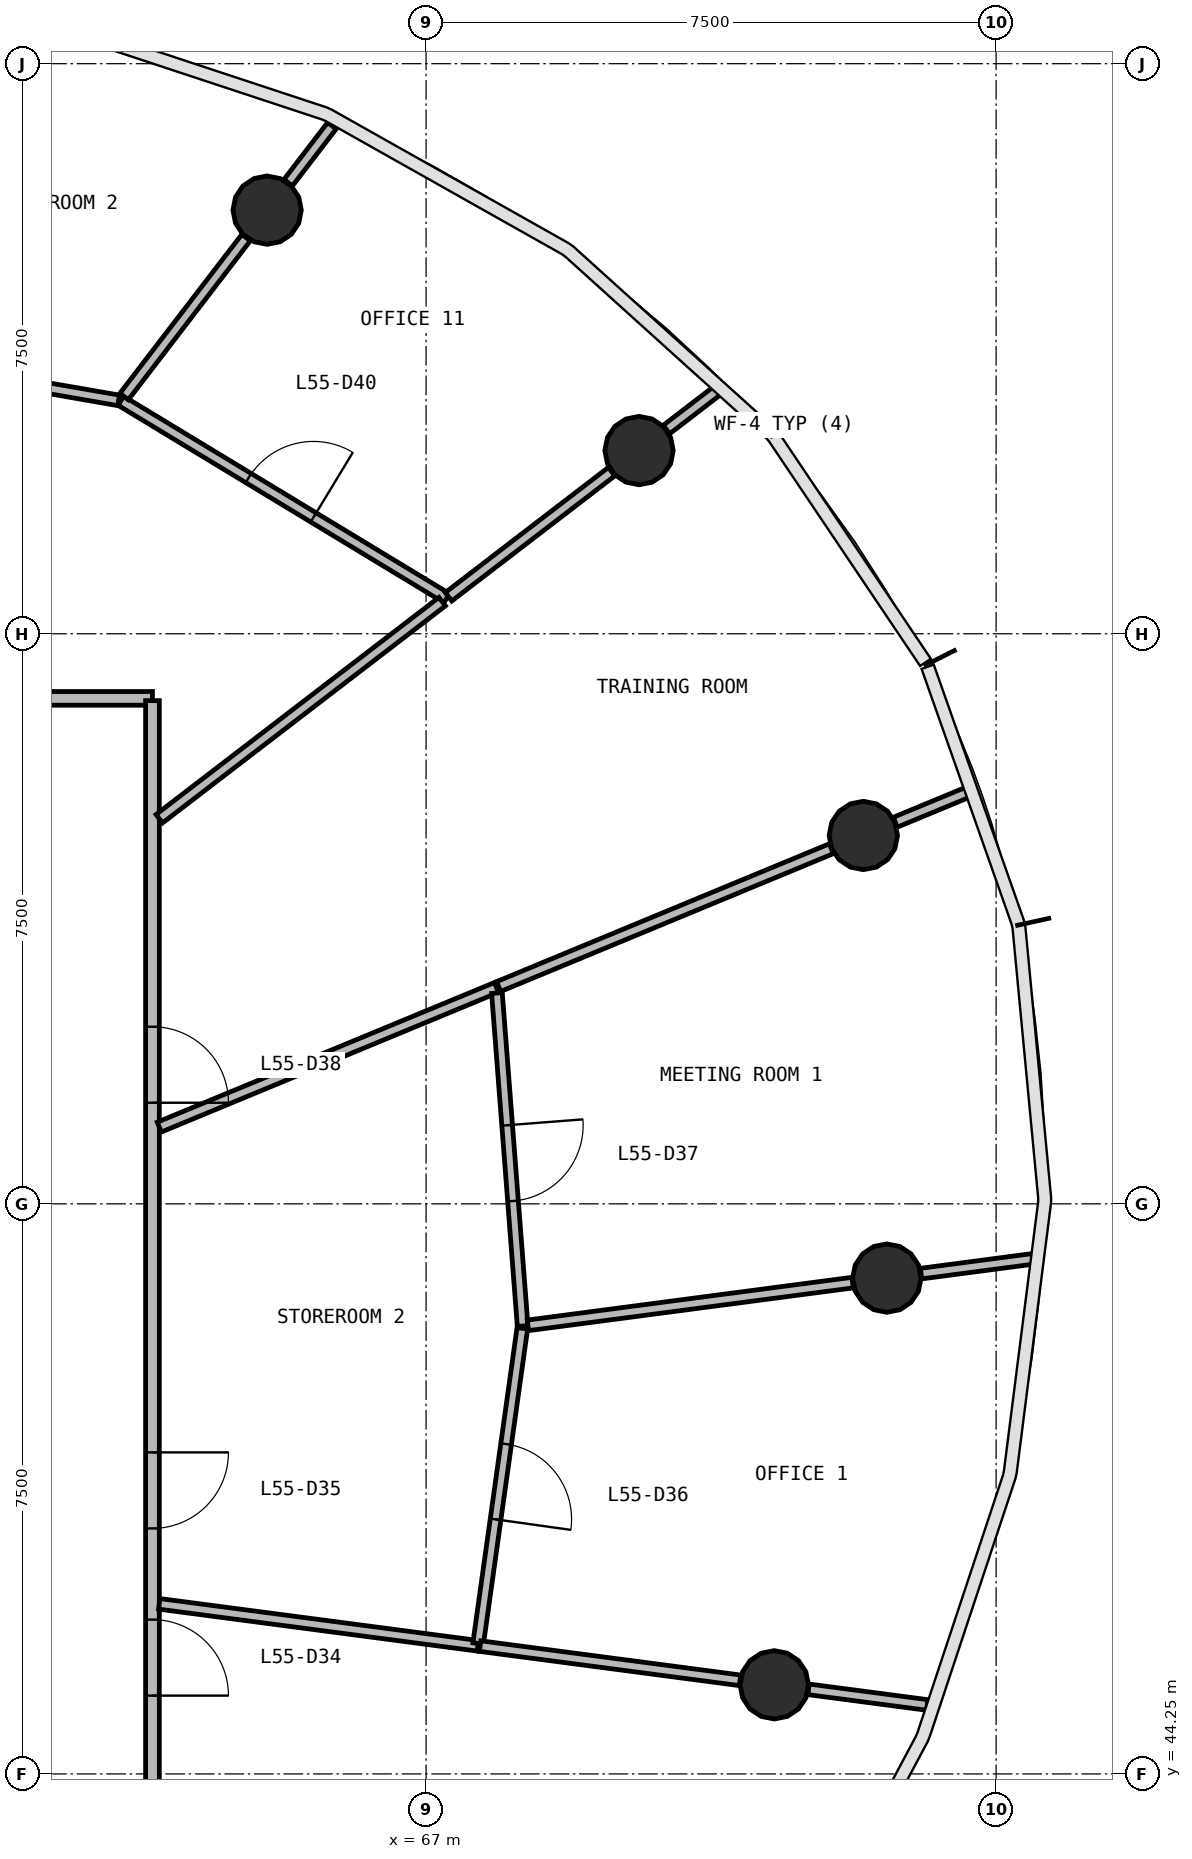
"""IFC4 building model, lengths in metres.
Left out: names, types, materials, properties, quantities, classifications, styles, units other than length and angle.
Written with IfcOpenShell. Run it as: python <this file> out.ifc"""

import sys

from ifc_helpers import new_model, si_unit, direction, frame, frame_2d, origin, origin_2d, place, context, subcontext, project, spatial, rectangle, circle, extrude, source, transform, mapped, element, fill, save


model = new_model("IFC4")
c1 = context("Model", 3, precision=1e-05, world=origin(), true_north=direction((0.0, 1.0)))
c2 = subcontext(c1, "Body", "Model", "MODEL_VIEW")
j1 = project(units=[si_unit("LENGTHUNIT", "METRE"), si_unit("PLANEANGLEUNIT", "RADIAN")], contexts=[c1])
p1 = place(None, origin())
s1 = spatial("IfcSite", under=j1, at=p1, CompositionType="ELEMENT")
p2 = place(p1, origin())
s2 = spatial("IfcBuilding", under=s1, at=p2, CompositionType="ELEMENT")
p3 = place(p2, frame((0.0, 0.0, 226.7)))
s3 = spatial("IfcBuildingStorey", under=s2, at=p3, CompositionType="ELEMENT", Elevation=226.7)
m1 = source(origin(), c2, "Body", "SweptSolid", [
    extrude(circle(Radius=0.45, at=origin_2d()), origin(), (0.0, 0.0, 1.0), 3.9),
])
for number, where, z_axis, x_axis in (
    (1, (73.062, 50.773, 0.0), (0.0, 0.0, 1.0), (1.0, 0.0, 0.0)),
    (2, (72.753, 56.596, 0.0), (0.0, 0.0, 1.0), (1.0, 0.0, 0.0)),
    (3, (69.802, 61.66, 0.0), (0.0, 0.0, 1.0), (1.0, 0.0, 0.0)),
    (4, (64.909, 64.823, 0.0), (0.0, 0.0, 1.0), (1.0, 0.0, 0.0)),
    (5, (71.581, 45.422, 0.0), (0.0, 0.0, 1.0), (1.0, 0.0, 0.0)),
):
    element("IfcColumn", number, at=place(p3, frame(where, z_axis=z_axis, x_axis=x_axis)), inside=s3, PredefinedType="COLUMN", context=c2, shape_type="MappedRepresentation", body=[
        mapped(m1, transform((0.0, 0.0, 0.0), scale=1.0)),
    ])
p4 = place(p3, frame((40.6, 58.4, 0.0), z_axis=(0.0, 0.0, 1.0), x_axis=(1.0, 0.0, 0.0)))
e6 = element("IfcWall", 6, at=p4, inside=s3, PredefinedType="PARTITIONING", context=c2, shape_type="SweptSolid", body=[
    extrude(rectangle(XDim=22.8, YDim=0.18, at=frame_2d((11.4, 0.0))), origin(), (0.0, 0.0, 1.0), 2.7),
])
p5 = place(p4, frame((2.05, 0.0, 0.0)))
e7 = element("IfcOpeningElement", 7, at=p5, cuts=e6, PredefinedType="OPENING", context=c2, shape_type="SweptSolid", body=[
    extrude(rectangle(XDim=0.9, YDim=2.1, at=frame_2d((0.45, 1.05))), frame((0.0, 0.1, 0.0), z_axis=(0.0, -1.0, 0.0), x_axis=(1.0, 0.0, 0.0)), (0.0, 0.0, 1.0), 0.2),
])
p6 = place(p4, frame((12.95, 0.0, 0.0)))
e8 = element("IfcOpeningElement", 8, at=p6, cuts=e6, PredefinedType="OPENING", context=c2, shape_type="SweptSolid", body=[
    extrude(rectangle(XDim=1.0, YDim=2.1, at=frame_2d((0.5, 1.05))), frame((0.0, 0.1, 0.0), z_axis=(0.0, -1.0, 0.0), x_axis=(1.0, 0.0, 0.0)), (0.0, 0.0, 1.0), 0.2),
])
p7 = place(p4, frame((10.95, 0.0, 0.0)))
e9 = element("IfcOpeningElement", 9, at=p7, cuts=e6, PredefinedType="OPENING", context=c2, shape_type="SweptSolid", body=[
    extrude(rectangle(XDim=1.0, YDim=2.1, at=frame_2d((0.5, 1.05))), frame((0.0, 0.1, 0.0), z_axis=(0.0, -1.0, 0.0), x_axis=(1.0, 0.0, 0.0)), (0.0, 0.0, 1.0), 0.2),
])
p8 = place(p3, frame((63.4, 58.37, 0.0), z_axis=(0.0, 0.0, 1.0), x_axis=(0.0, -1.0, 0.0)))
e10 = element("IfcWall", 10, at=p8, inside=s3, PredefinedType="PARTITIONING", context=c2, shape_type="SweptSolid", body=[
    extrude(rectangle(XDim=20.74, YDim=0.18, at=frame_2d((10.37, 0.0))), origin(), (0.0, 0.0, 1.0), 2.7),
])
p9 = place(p8, frame((12.09, 0.0, 0.0)))
e11 = element("IfcOpeningElement", 11, at=p9, cuts=e10, PredefinedType="OPENING", context=c2, shape_type="SweptSolid", body=[
    extrude(rectangle(XDim=1.0, YDim=2.1, at=frame_2d((0.5, 1.05))), frame((0.0, 0.1, 0.0), z_axis=(0.0, -1.0, 0.0), x_axis=(1.0, 0.0, 0.0)), (0.0, 0.0, 1.0), 0.2),
])
p10 = place(p8, frame((9.89, 0.0, 0.0)))
e12 = element("IfcOpeningElement", 12, at=p10, cuts=e10, PredefinedType="OPENING", context=c2, shape_type="SweptSolid", body=[
    extrude(rectangle(XDim=1.0, YDim=2.1, at=frame_2d((0.5, 1.05))), frame((0.0, 0.1, 0.0), z_axis=(0.0, -1.0, 0.0), x_axis=(1.0, 0.0, 0.0)), (0.0, 0.0, 1.0), 0.2),
])
p11 = place(p8, frame((4.29, 0.0, 0.0)))
e13 = element("IfcOpeningElement", 13, at=p11, cuts=e10, PredefinedType="OPENING", context=c2, shape_type="SweptSolid", body=[
    extrude(rectangle(XDim=1.0, YDim=2.1, at=frame_2d((0.5, 1.05))), frame((0.0, 0.1, 0.0), z_axis=(0.0, -1.0, 0.0), x_axis=(1.0, 0.0, 0.0)), (0.0, 0.0, 1.0), 0.2),
])
p12 = place(p3, frame((62.985, 62.315, 0.0), z_axis=(0.0, 0.0, 1.0), x_axis=(0.855336503229, -0.518072838744, 0.0)))
e14 = element("IfcWall", 14, at=p12, inside=s3, PredefinedType="PARTITIONING", context=c2, shape_type="SweptSolid", body=[
    extrude(rectangle(XDim=5.012, YDim=0.14, at=frame_2d((2.506, 0.0))), origin(), (0.0, 0.0, 1.0), 2.7),
])
p13 = place(p12, frame((1.962, 0.0, 0.0)))
e15 = element("IfcOpeningElement", 15, at=p13, cuts=e14, PredefinedType="OPENING", context=c2, shape_type="SweptSolid", body=[
    extrude(rectangle(XDim=1.0, YDim=2.1, at=frame_2d((0.5, 1.05))), frame((0.0, 0.08, 0.0), z_axis=(0.0, -1.0, 0.0), x_axis=(1.0, 0.0, 0.0)), (0.0, 0.0, 1.0), 0.16),
])
p14 = place(p3, frame((63.49, 52.759, 0.0), z_axis=(0.0, 0.0, 1.0), x_axis=(0.923870600529, 0.382704995366, 0.0)))
e16 = element("IfcWall", 16, at=p14, inside=s3, PredefinedType="PARTITIONING", context=c2, shape_type="SweptSolid", body=[
    extrude(rectangle(XDim=4.802, YDim=0.14, at=frame_2d((2.401, 0.0))), origin(), (0.0, 0.0, 1.0), 2.7),
])
p15 = place(p3, frame((63.49, 56.817, 0.0), z_axis=(0.0, 0.0, 1.0), x_axis=(0.793370109793, 0.608739573945, 0.0)))
e17 = element("IfcWall", 17, at=p15, inside=s3, PredefinedType="PARTITIONING", context=c2, shape_type="SweptSolid", body=[
    extrude(rectangle(XDim=4.692, YDim=0.14, at=frame_2d((2.346, 0.0))), origin(), (0.0, 0.0, 1.0), 2.7),
])
p16 = place(p3, frame((58.269, 63.134, 0.0), z_axis=(0.0, 0.0, 1.0), x_axis=(0.985247147455, -0.171137542441, 0.0)))
e18 = element("IfcWall", 18, at=p16, inside=s3, PredefinedType="PARTITIONING", context=c2, shape_type="SweptSolid", body=[
    extrude(rectangle(XDim=4.756, YDim=0.14, at=frame_2d((2.378, 0.0))), origin(), (0.0, 0.0, 1.0), 2.7),
])
p17 = place(p16, frame((1.906, 0.0, 0.0)))
e19 = element("IfcOpeningElement", 19, at=p17, cuts=e18, PredefinedType="OPENING", context=c2, shape_type="SweptSolid", body=[
    extrude(rectangle(XDim=1.0, YDim=2.1, at=frame_2d((0.5, 1.05))), frame((0.0, 0.08, 0.0), z_axis=(0.0, -1.0, 0.0), x_axis=(1.0, 0.0, 0.0)), (0.0, 0.0, 1.0), 0.16),
])
p18 = place(p3, frame((67.955, 54.609, 0.0), z_axis=(0.0, 0.0, 1.0), x_axis=(0.923881204853, 0.38267939495, 0.0)))
e20 = element("IfcWall", 20, at=p18, inside=s3, PredefinedType="PARTITIONING", context=c2, shape_type="SweptSolid", body=[
    extrude(rectangle(XDim=4.739, YDim=0.14, at=frame_2d((2.37, 0.0))), origin(), (0.0, 0.0, 1.0), 2.7),
])
p19 = place(p3, frame((67.932, 54.524, 0.0), z_axis=(0.0, 0.0, 1.0), x_axis=(0.076998122005, -0.997031237829, 0.0)))
e21 = element("IfcWall", 21, at=p19, inside=s3, PredefinedType="PARTITIONING", context=c2, shape_type="SweptSolid", body=[
    extrude(rectangle(XDim=4.395, YDim=0.14, at=frame_2d((2.197, 0.0))), origin(), (0.0, 0.0, 1.0), 2.7),
])
p20 = place(p19, frame((1.745, 0.0, 0.0)))
e22 = element("IfcOpeningElement", 22, at=p20, cuts=e21, PredefinedType="OPENING", context=c2, shape_type="SweptSolid", body=[
    extrude(rectangle(XDim=1.0, YDim=2.1, at=frame_2d((0.5, 1.05))), frame((0.0, 0.08, 0.0), z_axis=(0.0, -1.0, 0.0), x_axis=(1.0, 0.0, 0.0)), (0.0, 0.0, 1.0), 0.16),
])
p21 = place(p3, frame((68.34, 50.151, 0.0), z_axis=(0.0, 0.0, 1.0), x_axis=(0.991441368776, 0.130552718389, 0.0)))
e23 = element("IfcWall", 23, at=p21, inside=s3, PredefinedType="PARTITIONING", context=c2, shape_type="SweptSolid", body=[
    extrude(rectangle(XDim=4.309, YDim=0.14, at=frame_2d((2.154, 0.0))), origin(), (0.0, 0.0, 1.0), 2.7),
])
p22 = place(p3, frame((63.49, 46.487, 0.0), z_axis=(0.0, 0.0, 1.0), x_axis=(0.991446431295, -0.130514266934, 0.0)))
e24 = element("IfcWall", 24, at=p22, inside=s3, PredefinedType="PARTITIONING", context=c2, shape_type="SweptSolid", body=[
    extrude(rectangle(XDim=4.228, YDim=0.14, at=frame_2d((2.114, 0.0))), origin(), (0.0, 0.0, 1.0), 2.7),
])
p23 = place(p3, frame((68.267, 50.112, 0.0), z_axis=(0.0, 0.0, 1.0), x_axis=(-0.138751908501, -0.990327172144, 0.0)))
e25 = element("IfcWall", 25, at=p23, inside=s3, PredefinedType="PARTITIONING", context=c2, shape_type="SweptSolid", body=[
    extrude(rectangle(XDim=4.188, YDim=0.14, at=frame_2d((2.094, 0.0))), origin(), (0.0, 0.0, 1.0), 2.7),
])
p24 = place(p23, frame((1.538, 0.0, 0.0)))
e26 = element("IfcOpeningElement", 26, at=p24, cuts=e25, PredefinedType="OPENING", context=c2, shape_type="SweptSolid", body=[
    extrude(rectangle(XDim=1.0, YDim=2.1, at=frame_2d((0.5, 1.05))), frame((0.0, 0.08, 0.0), z_axis=(0.0, -1.0, 0.0), x_axis=(1.0, 0.0, 0.0)), (0.0, 0.0, 1.0), 0.16),
])
p25 = place(p3, frame((67.711, 45.932, 0.0), z_axis=(0.0, 0.0, 1.0), x_axis=(0.991442967003, -0.130540580589, 0.0)))
e27 = element("IfcWall", 27, at=p25, inside=s3, PredefinedType="PARTITIONING", context=c2, shape_type="SweptSolid", body=[
    extrude(rectangle(XDim=3.449, YDim=0.14, at=frame_2d((1.724, 0.0))), origin(), (0.0, 0.0, 1.0), 2.7),
])
p26 = place(p3, frame((67.295, 59.737, 0.0), z_axis=(0.0, 0.0, 1.0), x_axis=(0.793344806352, 0.608772550494, 0.0)))
e28 = element("IfcWall", 28, at=p26, inside=s3, PredefinedType="PARTITIONING", context=c2, shape_type="SweptSolid", body=[
    extrude(rectangle(XDim=2.705, YDim=0.14, at=frame_2d((1.353, 0.0))), origin(), (0.0, 0.0, 1.0), 2.7),
])
p27 = place(p3, frame((63.027, 62.371, 0.0), z_axis=(0.0, 0.0, 1.0), x_axis=(0.60876591882, 0.793349895118, 0.0)))
e29 = element("IfcWall", 29, at=p27, inside=s3, PredefinedType="PARTITIONING", context=c2, shape_type="SweptSolid", body=[
    extrude(rectangle(XDim=2.636, YDim=0.14, at=frame_2d((1.318, 0.0))), origin(), (0.0, 0.0, 1.0), 2.7),
])
p28 = place(p3, frame((72.031, 45.363, 0.0), z_axis=(0.0, 0.0, 1.0), x_axis=(0.991431072845, -0.130630883778, 0.0)))
e30 = element("IfcWall", 30, at=p28, inside=s3, PredefinedType="PARTITIONING", context=c2, shape_type="SweptSolid", body=[
    extrude(rectangle(XDim=1.575, YDim=0.14, at=frame_2d((0.788, 0.0))), origin(), (0.0, 0.0, 1.0), 2.7),
])
p29 = place(p3, frame((73.513, 50.832, 0.0), z_axis=(0.0, 0.0, 1.0), x_axis=(0.991448742538, 0.130496708462, 0.0)))
e31 = element("IfcWall", 31, at=p29, inside=s3, PredefinedType="PARTITIONING", context=c2, shape_type="SweptSolid", body=[
    extrude(rectangle(XDim=1.497, YDim=0.14, at=frame_2d((0.748, 0.0))), origin(), (0.0, 0.0, 1.0), 2.7),
])
p30 = place(p3, frame((73.174, 56.77, 0.0), z_axis=(0.0, 0.0, 1.0), x_axis=(0.923885455133, 0.382669133579, 0.0)))
e32 = element("IfcWall", 32, at=p30, inside=s3, PredefinedType="PARTITIONING", context=c2, shape_type="SweptSolid", body=[
    extrude(rectangle(XDim=1.087, YDim=0.14, at=frame_2d((0.543, 0.0))), origin(), (0.0, 0.0, 1.0), 2.7),
])
p31 = place(p3, frame((65.186, 65.184, 0.0), z_axis=(0.0, 0.0, 1.0), x_axis=(0.608637437939, 0.793448466593, 0.0)))
e33 = element("IfcWall", 33, at=p31, inside=s3, PredefinedType="PARTITIONING", context=c2, shape_type="SweptSolid", body=[
    extrude(rectangle(XDim=0.946, YDim=0.14, at=frame_2d((0.473, 0.0))), origin(), (0.0, 0.0, 1.0), 2.7),
])
p32 = place(p3, frame((70.163, 61.937, 0.0), z_axis=(0.0, 0.0, 1.0), x_axis=(0.793325147434, 0.608798168894, 0.0)))
e34 = element("IfcWall", 34, at=p32, inside=s3, PredefinedType="PARTITIONING", context=c2, shape_type="SweptSolid", body=[
    extrude(rectangle(XDim=0.867, YDim=0.14, at=frame_2d((0.433, 0.0))), origin(), (0.0, 0.0, 1.0), 2.7),
])
m2 = source(origin(), c2, "Body", "SweptSolid", [
    extrude(rectangle(XDim=1.0, YDim=2.1, at=frame_2d((0.5, 1.05))), frame((0.0, 0.025, 0.0), z_axis=(0.0, -1.0, 0.0), x_axis=(1.0, 0.0, 0.0)), (0.0, 0.0, 1.0), 0.05),
])
p33 = place(p9, origin())
e35 = element("IfcDoor", 35, at=p33, inside=s3, OperationType="SINGLE_SWING_RIGHT", PredefinedType="DOOR", context=c2, shape_type="MappedRepresentation", body=[
    mapped(m2, transform((0.0, 0.0, 0.0), scale=1.0)),
])
fill(e11, e35)
p34 = place(p10, origin())
e36 = element("IfcDoor", 36, at=p34, inside=s3, OperationType="SINGLE_SWING_LEFT", PredefinedType="DOOR", context=c2, shape_type="MappedRepresentation", body=[
    mapped(m2, transform((0.0, 0.0, 0.0), scale=1.0)),
])
fill(e12, e36)
p35 = place(p24, origin())
e37 = element("IfcDoor", 37, at=p35, inside=s3, OperationType="SINGLE_SWING_RIGHT", PredefinedType="DOOR", context=c2, shape_type="MappedRepresentation", body=[
    mapped(m2, transform((0.0, 0.0, 0.0), scale=1.0)),
])
fill(e26, e37)
p36 = place(p20, origin())
e38 = element("IfcDoor", 38, at=p36, inside=s3, OperationType="SINGLE_SWING_LEFT", PredefinedType="DOOR", context=c2, shape_type="MappedRepresentation", body=[
    mapped(m2, transform((0.0, 0.0, 0.0), scale=1.0)),
])
fill(e22, e38)
p37 = place(p11, origin())
e39 = element("IfcDoor", 39, at=p37, inside=s3, OperationType="SINGLE_SWING_RIGHT", PredefinedType="DOOR", context=c2, shape_type="MappedRepresentation", body=[
    mapped(m2, transform((0.0, 0.0, 0.0), scale=1.0)),
])
fill(e13, e39)
p38 = place(p13, origin())
e40 = element("IfcDoor", 40, at=p38, inside=s3, OperationType="SINGLE_SWING_RIGHT", PredefinedType="DOOR", context=c2, shape_type="MappedRepresentation", body=[
    mapped(m2, transform((0.0, 0.0, 0.0), scale=1.0)),
])
fill(e15, e40)
save(model, sys.argv[1])
